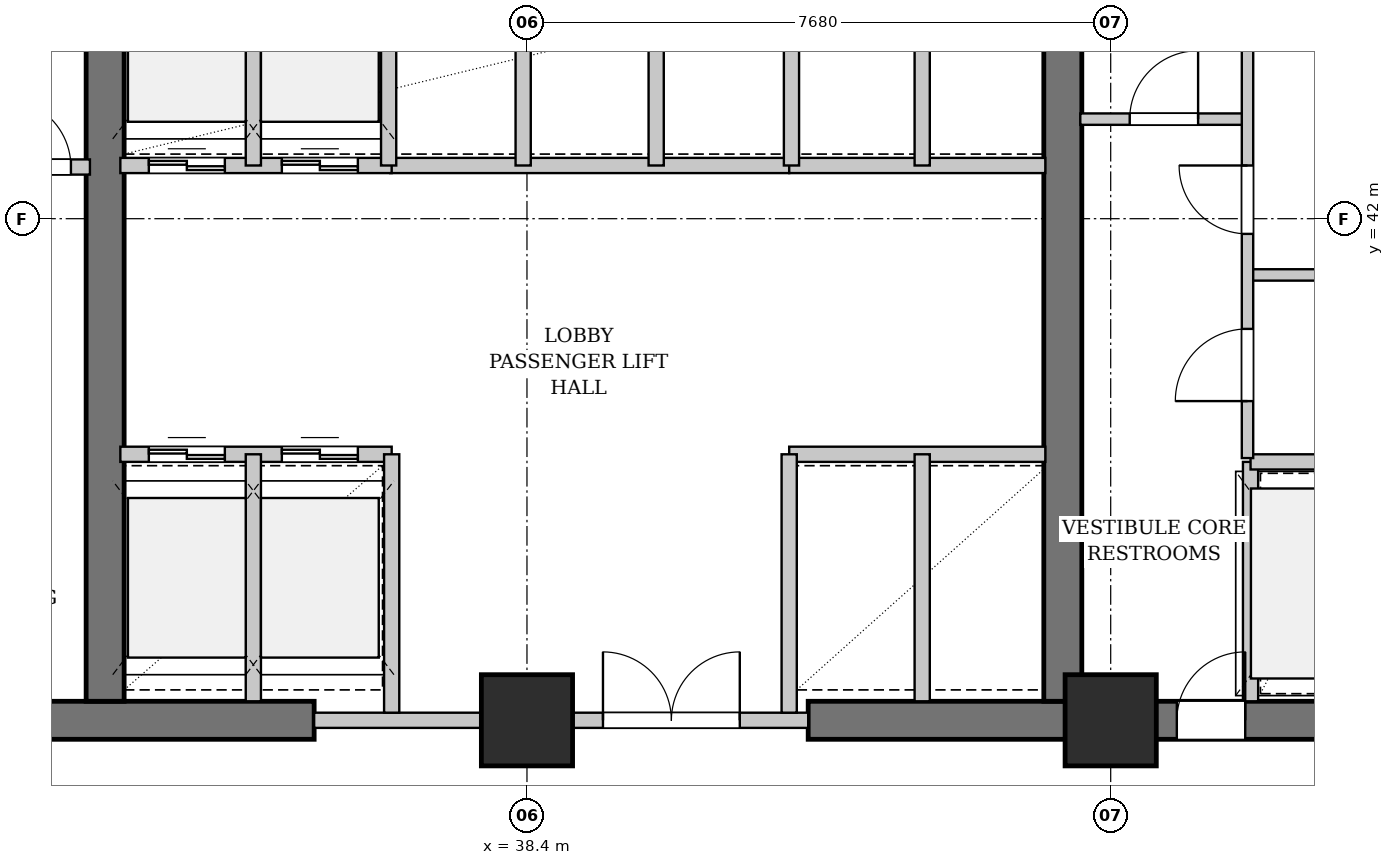
"""IFC4 building model, lengths in metres.
Left out: names, types, materials, properties, quantities, classifications, styles, units other than length and angle.
Written with IfcOpenShell. Run it as: python <this file> out.ifc"""

import sys

from ifc_helpers import new_model, si_unit, direction, frame, frame_2d, origin, origin_2d, place, context, subcontext, project, spatial, rectangle, extrude, element, fill, save


model = new_model("IFC4")
c1 = context("Model", 3, precision=1e-05, world=origin(), true_north=direction((0.0, 1.0)))
c2 = subcontext(c1, "Body", "Model", "MODEL_VIEW")
j1 = project(units=[si_unit("LENGTHUNIT", "METRE"), si_unit("PLANEANGLEUNIT", "RADIAN")], contexts=[c1])
p1 = place(None, origin())
s1 = spatial("IfcSite", under=j1, at=p1, CompositionType="ELEMENT")
p2 = place(p1, origin())
s2 = spatial("IfcBuilding", under=s1, at=p2, CompositionType="ELEMENT")
p3 = place(p2, frame((0.0, 0.0, 37.2)))
s3 = spatial("IfcBuildingStorey", under=s2, at=p3, CompositionType="ELEMENT", Elevation=37.2)
p4 = place(p3, frame((30.72, 35.4, 0.0), z_axis=(0.0, 0.0, 1.0), x_axis=(1.0, 0.0, 0.0)))
e1 = element("IfcWall", 1, at=p4, inside=s3, PredefinedType="SHEAR", context=c2, shape_type="SweptSolid", body=[
    extrude(rectangle(XDim=4.88, YDim=0.5, at=frame_2d((2.44, 0.0))), origin(), (0.0, 0.0, 1.0), 3.18),
])
p5 = place(p3, frame((42.1, 35.4, 0.0), z_axis=(0.0, 0.0, 1.0), x_axis=(1.0, 0.0, 0.0)))
e2 = element("IfcWall", 2, at=p5, inside=s3, PredefinedType="SHEAR", context=c2, shape_type="SweptSolid", body=[
    extrude(rectangle(XDim=8.05, YDim=0.5, at=frame_2d((4.025, 0.0))), origin(), (0.0, 0.0, 1.0), 3.18),
])
p6 = place(p5, frame((4.85, 0.0, 0.0)))
e3 = element("IfcOpeningElement", 3, at=p6, cuts=e2, PredefinedType="OPENING", context=c2, shape_type="SweptSolid", body=[
    extrude(rectangle(XDim=0.9, YDim=2.15, at=frame_2d((0.45, 1.075))), frame((0.0, 0.26, 0.0), z_axis=(0.0, -1.0, 0.0), x_axis=(1.0, 0.0, 0.0)), (0.0, 0.0, 1.0), 0.52),
])
for number, where, z_axis, x_axis in (
    (4, (32.85, 35.65, 0.0), (0.0, 0.0, 1.0), (0.0, 1.0, 0.0)),
    (5, (45.45, 35.65, 0.0), (0.0, 0.0, 1.0), (0.0, 1.0, 0.0)),
):
    element("IfcWall", number, at=place(p3, frame(where, z_axis=z_axis, x_axis=x_axis)), inside=s3, PredefinedType="SHEAR", context=c2, shape_type="SweptSolid", body=[
        extrude(rectangle(XDim=10.3, YDim=0.5, at=frame_2d((5.15, 0.0))), origin(), (0.0, 0.0, 1.0), 3.18),
    ])
for number, where, z_axis, x_axis in (
    (6, (38.4, 35.4, 0.0), (0.0, 0.0, 1.0), (1.0, 0.0, 0.0)),
    (7, (46.08, 35.4, 0.0), (0.0, 0.0, 1.0), (1.0, 0.0, 0.0)),
):
    element("IfcColumn", number, at=place(p3, frame(where, z_axis=z_axis, x_axis=x_axis)), inside=s3, PredefinedType="COLUMN", context=c2, shape_type="SweptSolid", body=[
        extrude(rectangle(XDim=1.2, YDim=1.2, at=origin_2d()), origin(), (0.0, 0.0, 1.0), 3.4),
    ])
p7 = place(p3, frame((27.32, 42.68, 0.0), z_axis=(0.0, 0.0, 1.0), x_axis=(1.0, 0.0, 0.0)))
e8 = element("IfcWall", 8, at=p7, inside=s3, PredefinedType="PARTITIONING", context=c2, shape_type="SweptSolid", body=[
    extrude(rectangle(XDim=5.33, YDim=0.2, at=frame_2d((2.665, 0.0))), origin(), (0.0, 0.0, 1.0), 3.18),
])
p8 = place(p7, frame((4.18, 0.0, 0.0)))
e9 = element("IfcOpeningElement", 9, at=p8, cuts=e8, PredefinedType="OPENING", context=c2, shape_type="SweptSolid", body=[
    extrude(rectangle(XDim=0.9, YDim=2.15, at=frame_2d((0.45, 1.075))), frame((0.0, 0.11, 0.0), z_axis=(0.0, -1.0, 0.0), x_axis=(1.0, 0.0, 0.0)), (0.0, 0.0, 1.0), 0.22),
])
p9 = place(p3, frame((35.6, 35.4, 0.0), z_axis=(0.0, 0.0, 1.0), x_axis=(1.0, 0.0, 0.0)))
e10 = element("IfcWall", 10, at=p9, inside=s3, PredefinedType="PARTITIONING", context=c2, shape_type="SweptSolid", body=[
    extrude(rectangle(XDim=6.5, YDim=0.2, at=frame_2d((3.25, 0.0))), origin(), (0.0, 0.0, 1.0), 2.475),
])
p10 = place(p9, frame((3.8, 0.0, 0.0)))
e11 = element("IfcOpeningElement", 11, at=p10, cuts=e10, PredefinedType="OPENING", context=c2, shape_type="SweptSolid", body=[
    extrude(rectangle(XDim=1.8, YDim=2.3, at=frame_2d((0.9, 1.15))), frame((0.0, 0.11, 0.0), z_axis=(0.0, -1.0, 0.0), x_axis=(1.0, 0.0, 0.0)), (0.0, 0.0, 1.0), 0.22),
])
p11 = place(p3, frame((36.6, 42.7, 0.0), z_axis=(0.0, 0.0, 1.0), x_axis=(1.0, 0.0, 0.0)))
e12 = element("IfcWall", 12, at=p11, inside=s3, PredefinedType="PARTITIONING", context=c2, shape_type="SweptSolid", body=[
    extrude(rectangle(XDim=5.25, YDim=0.2, at=frame_2d((2.625, 0.0))), origin(), (0.0, 0.0, 1.0), 3.18),
])
p12 = place(p3, frame((38.35, 42.7, 0.0), z_axis=(0.0, 0.0, 1.0), x_axis=(0.0, 1.0, 0.0)))
e13 = element("IfcWall", 13, at=p12, inside=s3, PredefinedType="PARTITIONING", context=c2, shape_type="SweptSolid", body=[
    extrude(rectangle(XDim=3.22, YDim=0.2, at=frame_2d((1.61, 0.0))), origin(), (0.0, 0.0, 1.0), 2.475),
])
p13 = place(p3, frame((40.1, 42.7, 0.0), z_axis=(0.0, 0.0, 1.0), x_axis=(0.0, 1.0, 0.0)))
e14 = element("IfcWall", 14, at=p13, inside=s3, PredefinedType="PARTITIONING", context=c2, shape_type="SweptSolid", body=[
    extrude(rectangle(XDim=3.22, YDim=0.2, at=frame_2d((1.61, 0.0))), origin(), (0.0, 0.0, 1.0), 3.18),
])
p14 = place(p3, frame((33.05, 38.9, 0.0), z_axis=(0.0, 0.0, 1.0), x_axis=(1.0, 0.0, 0.0)))
e15 = element("IfcWall", 15, at=p14, inside=s3, PredefinedType="PARTITIONING", context=c2, shape_type="SweptSolid", body=[
    extrude(rectangle(XDim=3.57, YDim=0.2, at=frame_2d((1.785, 0.0))), origin(), (0.0, 0.0, 1.0), 3.18),
])
p15 = place(p14, frame((0.375, 0.0, 0.0)))
e16 = element("IfcOpeningElement", 16, at=p15, cuts=e15, PredefinedType="OPENING", context=c2, shape_type="SweptSolid", body=[
    extrude(rectangle(XDim=1.0, YDim=2.2, at=frame_2d((0.5, 1.1))), frame((0.0, 0.11, 0.0), z_axis=(0.0, -1.0, 0.0), x_axis=(1.0, 0.0, 0.0)), (0.0, 0.0, 1.0), 0.22),
])
p16 = place(p14, frame((2.125, 0.0, 0.0)))
e17 = element("IfcOpeningElement", 17, at=p16, cuts=e15, PredefinedType="OPENING", context=c2, shape_type="SweptSolid", body=[
    extrude(rectangle(XDim=1.0, YDim=2.2, at=frame_2d((0.5, 1.1))), frame((0.0, 0.11, 0.0), z_axis=(0.0, -1.0, 0.0), x_axis=(1.0, 0.0, 0.0)), (0.0, 0.0, 1.0), 0.22),
])
p17 = place(p3, frame((33.05, 42.7, 0.0), z_axis=(0.0, 0.0, 1.0), x_axis=(1.0, 0.0, 0.0)))
e18 = element("IfcWall", 18, at=p17, inside=s3, PredefinedType="PARTITIONING", context=c2, shape_type="SweptSolid", body=[
    extrude(rectangle(XDim=3.57, YDim=0.2, at=frame_2d((1.785, 0.0))), origin(), (0.0, 0.0, 1.0), 3.18),
])
p18 = place(p17, frame((0.375, 0.0, 0.0)))
e19 = element("IfcOpeningElement", 19, at=p18, cuts=e18, PredefinedType="OPENING", context=c2, shape_type="SweptSolid", body=[
    extrude(rectangle(XDim=1.0, YDim=2.2, at=frame_2d((0.5, 1.1))), frame((0.0, 0.11, 0.0), z_axis=(0.0, -1.0, 0.0), x_axis=(1.0, 0.0, 0.0)), (0.0, 0.0, 1.0), 0.22),
])
p19 = place(p17, frame((2.125, 0.0, 0.0)))
e20 = element("IfcOpeningElement", 20, at=p19, cuts=e18, PredefinedType="OPENING", context=c2, shape_type="SweptSolid", body=[
    extrude(rectangle(XDim=1.0, YDim=2.2, at=frame_2d((0.5, 1.1))), frame((0.0, 0.11, 0.0), z_axis=(0.0, -1.0, 0.0), x_axis=(1.0, 0.0, 0.0)), (0.0, 0.0, 1.0), 0.22),
])
p20 = place(p3, frame((34.8, 35.65, 0.0), z_axis=(0.0, 0.0, 1.0), x_axis=(0.0, 1.0, 0.0)))
e21 = element("IfcWall", 21, at=p20, inside=s3, PredefinedType="PARTITIONING", context=c2, shape_type="SweptSolid", body=[
    extrude(rectangle(XDim=3.25, YDim=0.2, at=frame_2d((1.625, 0.0))), origin(), (0.0, 0.0, 1.0), 3.18),
])
p21 = place(p3, frame((34.8, 42.7, 0.0), z_axis=(0.0, 0.0, 1.0), x_axis=(0.0, 1.0, 0.0)))
e22 = element("IfcWall", 22, at=p21, inside=s3, PredefinedType="PARTITIONING", context=c2, shape_type="SweptSolid", body=[
    extrude(rectangle(XDim=3.22, YDim=0.2, at=frame_2d((1.61, 0.0))), origin(), (0.0, 0.0, 1.0), 3.18),
])
p22 = place(p3, frame((36.62, 35.5, 0.0), z_axis=(0.0, 0.0, 1.0), x_axis=(0.0, 1.0, 0.0)))
e23 = element("IfcWall", 23, at=p22, inside=s3, PredefinedType="PARTITIONING", context=c2, shape_type="SweptSolid", body=[
    extrude(rectangle(XDim=3.4, YDim=0.2, at=frame_2d((1.7, 0.0))), origin(), (0.0, 0.0, 1.0), 3.18),
])
p23 = place(p3, frame((36.58, 42.7, 0.0), z_axis=(0.0, 0.0, 1.0), x_axis=(0.0, 1.0, 0.0)))
e24 = element("IfcWall", 24, at=p23, inside=s3, PredefinedType="PARTITIONING", context=c2, shape_type="SweptSolid", body=[
    extrude(rectangle(XDim=3.22, YDim=0.2, at=frame_2d((1.61, 0.0))), origin(), (0.0, 0.0, 1.0), 3.18),
])
for number, where, z_axis, x_axis in (
    (25, (41.85, 38.9, 0.0), (0.0, 0.0, 1.0), (1.0, 0.0, 0.0)),
    (26, (41.85, 42.7, 0.0), (0.0, 0.0, 1.0), (1.0, 0.0, 0.0)),
):
    element("IfcWall", number, at=place(p3, frame(where, z_axis=z_axis, x_axis=x_axis)), inside=s3, PredefinedType="PARTITIONING", context=c2, shape_type="SweptSolid", body=[
        extrude(rectangle(XDim=3.37, YDim=0.2, at=frame_2d((1.685, 0.0))), origin(), (0.0, 0.0, 1.0), 3.18),
    ])
p24 = place(p3, frame((43.6, 35.65, 0.0), z_axis=(0.0, 0.0, 1.0), x_axis=(0.0, 1.0, 0.0)))
e27 = element("IfcWall", 27, at=p24, inside=s3, PredefinedType="PARTITIONING", context=c2, shape_type="SweptSolid", body=[
    extrude(rectangle(XDim=3.25, YDim=0.2, at=frame_2d((1.625, 0.0))), origin(), (0.0, 0.0, 1.0), 3.18),
])
p25 = place(p3, frame((43.6, 42.7, 0.0), z_axis=(0.0, 0.0, 1.0), x_axis=(0.0, 1.0, 0.0)))
e28 = element("IfcWall", 28, at=p25, inside=s3, PredefinedType="PARTITIONING", context=c2, shape_type="SweptSolid", body=[
    extrude(rectangle(XDim=3.22, YDim=0.2, at=frame_2d((1.61, 0.0))), origin(), (0.0, 0.0, 1.0), 3.18),
])
p26 = place(p3, frame((41.85, 35.5, 0.0), z_axis=(0.0, 0.0, 1.0), x_axis=(0.0, 1.0, 0.0)))
e29 = element("IfcWall", 29, at=p26, inside=s3, PredefinedType="PARTITIONING", context=c2, shape_type="SweptSolid", body=[
    extrude(rectangle(XDim=3.4, YDim=0.2, at=frame_2d((1.7, 0.0))), origin(), (0.0, 0.0, 1.0), 3.18),
])
p27 = place(p3, frame((41.88, 42.7, 0.0), z_axis=(0.0, 0.0, 1.0), x_axis=(0.0, 1.0, 0.0)))
e30 = element("IfcWall", 30, at=p27, inside=s3, PredefinedType="PARTITIONING", context=c2, shape_type="SweptSolid", body=[
    extrude(rectangle(XDim=3.22, YDim=0.2, at=frame_2d((1.61, 0.0))), origin(), (0.0, 0.0, 1.0), 3.18),
])
p28 = place(p3, frame((47.92, 35.65, 0.0), z_axis=(0.0, 0.0, 1.0), x_axis=(0.0, 1.0, 0.0)))
e31 = element("IfcWall", 31, at=p28, inside=s3, PredefinedType="PARTITIONING", context=c2, shape_type="SweptSolid", body=[
    extrude(rectangle(XDim=3.15, YDim=0.2, at=frame_2d((1.575, 0.0))), origin(), (0.0, 0.0, 1.0), 3.18),
])
p29 = place(p3, frame((47.92, 38.8, 0.0), z_axis=(0.0, 0.0, 1.0), x_axis=(1.0, 0.0, 0.0)))
e32 = element("IfcWall", 32, at=p29, inside=s3, PredefinedType="PARTITIONING", context=c2, shape_type="SweptSolid", body=[
    extrude(rectangle(XDim=1.86, YDim=0.2, at=frame_2d((0.93, 0.0))), origin(), (0.0, 0.0, 1.0), 3.18),
])
p30 = place(p3, frame((45.68, 43.31, 0.0), z_axis=(0.0, 0.0, 1.0), x_axis=(1.0, 0.0, 0.0)))
e33 = element("IfcWall", 33, at=p30, inside=s3, PredefinedType="PARTITIONING", context=c2, shape_type="SweptSolid", body=[
    extrude(rectangle(XDim=2.2, YDim=0.15, at=frame_2d((1.1, 0.0))), origin(), (0.0, 0.0, 1.0), 3.18),
])
p31 = place(p30, frame((0.65, 0.0, 0.0)))
e34 = element("IfcOpeningElement", 34, at=p31, cuts=e33, PredefinedType="OPENING", context=c2, shape_type="SweptSolid", body=[
    extrude(rectangle(XDim=0.9, YDim=2.15, at=frame_2d((0.45, 1.075))), frame((0.0, 0.085, 0.0), z_axis=(0.0, -1.0, 0.0), x_axis=(1.0, 0.0, 0.0)), (0.0, 0.0, 1.0), 0.17),
])
p32 = place(p3, frame((47.88, 41.26, 0.0), z_axis=(0.0, 0.0, 1.0), x_axis=(1.0, 0.0, 0.0)))
e35 = element("IfcWall", 35, at=p32, inside=s3, PredefinedType="PARTITIONING", context=c2, shape_type="SweptSolid", body=[
    extrude(rectangle(XDim=2.3, YDim=0.15, at=frame_2d((1.15, 0.0))), origin(), (0.0, 0.0, 1.0), 3.18),
])
p33 = place(p3, frame((47.88, 38.85, 0.0), z_axis=(0.0, 0.0, 1.0), x_axis=(0.0, 1.0, 0.0)))
e36 = element("IfcWall", 36, at=p33, inside=s3, PredefinedType="PARTITIONING", context=c2, shape_type="SweptSolid", body=[
    extrude(rectangle(XDim=7.07, YDim=0.15, at=frame_2d((3.535, 0.0))), origin(), (0.0, 0.0, 1.0), 3.18),
])
p34 = place(p33, frame((0.75, 0.0, 0.0)))
e37 = element("IfcOpeningElement", 37, at=p34, cuts=e36, PredefinedType="OPENING", context=c2, shape_type="SweptSolid", body=[
    extrude(rectangle(XDim=0.95, YDim=2.15, at=frame_2d((0.475, 1.075))), frame((0.0, 0.085, 0.0), z_axis=(0.0, -1.0, 0.0), x_axis=(1.0, 0.0, 0.0)), (0.0, 0.0, 1.0), 0.17),
])
p35 = place(p33, frame((2.95, 0.0, 0.0)))
e38 = element("IfcOpeningElement", 38, at=p35, cuts=e36, PredefinedType="OPENING", context=c2, shape_type="SweptSolid", body=[
    extrude(rectangle(XDim=0.9, YDim=2.15, at=frame_2d((0.45, 1.075))), frame((0.0, 0.085, 0.0), z_axis=(0.0, -1.0, 0.0), x_axis=(1.0, 0.0, 0.0)), (0.0, 0.0, 1.0), 0.17),
])
p36 = place(p8, origin())
e39 = element("IfcDoor", 39, at=p36, inside=s3, OperationType="SINGLE_SWING_LEFT", PredefinedType="DOOR", context=c2, shape_type="SweptSolid", body=[
    extrude(rectangle(XDim=0.9, YDim=2.15, at=frame_2d((0.45, 1.075))), frame((0.0, 0.025, 0.0), z_axis=(0.0, -1.0, 0.0), x_axis=(1.0, 0.0, 0.0)), (0.0, 0.0, 1.0), 0.05),
])
fill(e9, e39)
p37 = place(p10, origin())
e40 = element("IfcDoor", 40, at=p37, inside=s3, OperationType="DOUBLE_DOOR_SINGLE_SWING", PredefinedType="DOOR", context=c2, shape_type="SweptSolid", body=[
    extrude(rectangle(XDim=1.8, YDim=2.3, at=frame_2d((0.9, 1.15))), frame((0.0, 0.025, 0.0), z_axis=(0.0, -1.0, 0.0), x_axis=(1.0, 0.0, 0.0)), (0.0, 0.0, 1.0), 0.05),
])
fill(e11, e40)
p38 = place(p15, origin())
e41 = element("IfcDoor", 41, at=p38, inside=s3, OperationType="DOUBLE_DOOR_SLIDING", PredefinedType="DOOR", context=c2, shape_type="SweptSolid", body=[
    extrude(rectangle(XDim=1.0, YDim=2.2, at=frame_2d((0.5, 1.1))), frame((0.0, 0.025, 0.0), z_axis=(0.0, -1.0, 0.0), x_axis=(1.0, 0.0, 0.0)), (0.0, 0.0, 1.0), 0.05),
])
fill(e16, e41)
p39 = place(p16, origin())
e42 = element("IfcDoor", 42, at=p39, inside=s3, OperationType="DOUBLE_DOOR_SLIDING", PredefinedType="DOOR", context=c2, shape_type="SweptSolid", body=[
    extrude(rectangle(XDim=1.0, YDim=2.2, at=frame_2d((0.5, 1.1))), frame((0.0, 0.025, 0.0), z_axis=(0.0, -1.0, 0.0), x_axis=(1.0, 0.0, 0.0)), (0.0, 0.0, 1.0), 0.05),
])
fill(e17, e42)
p40 = place(p18, origin())
e43 = element("IfcDoor", 43, at=p40, inside=s3, OperationType="DOUBLE_DOOR_SLIDING", PredefinedType="DOOR", context=c2, shape_type="SweptSolid", body=[
    extrude(rectangle(XDim=1.0, YDim=2.2, at=frame_2d((0.5, 1.1))), frame((0.0, 0.025, 0.0), z_axis=(0.0, -1.0, 0.0), x_axis=(1.0, 0.0, 0.0)), (0.0, 0.0, 1.0), 0.05),
])
fill(e19, e43)
p41 = place(p19, origin())
e44 = element("IfcDoor", 44, at=p41, inside=s3, OperationType="DOUBLE_DOOR_SLIDING", PredefinedType="DOOR", context=c2, shape_type="SweptSolid", body=[
    extrude(rectangle(XDim=1.0, YDim=2.2, at=frame_2d((0.5, 1.1))), frame((0.0, 0.025, 0.0), z_axis=(0.0, -1.0, 0.0), x_axis=(1.0, 0.0, 0.0)), (0.0, 0.0, 1.0), 0.05),
])
fill(e20, e44)
p42 = place(p31, origin())
e45 = element("IfcDoor", 45, at=p42, inside=s3, OperationType="SINGLE_SWING_RIGHT", PredefinedType="DOOR", context=c2, shape_type="SweptSolid", body=[
    extrude(rectangle(XDim=0.9, YDim=2.15, at=frame_2d((0.45, 1.075))), frame((0.0, 0.025, 0.0), z_axis=(0.0, -1.0, 0.0), x_axis=(1.0, 0.0, 0.0)), (0.0, 0.0, 1.0), 0.05),
])
fill(e34, e45)
p43 = place(p34, origin())
e46 = element("IfcDoor", 46, at=p43, inside=s3, OperationType="SINGLE_SWING_LEFT", PredefinedType="DOOR", context=c2, shape_type="SweptSolid", body=[
    extrude(rectangle(XDim=0.95, YDim=2.15, at=frame_2d((0.475, 1.075))), frame((0.0, 0.025, 0.0), z_axis=(0.0, -1.0, 0.0), x_axis=(1.0, 0.0, 0.0)), (0.0, 0.0, 1.0), 0.05),
])
fill(e37, e46)
p44 = place(p35, origin())
e47 = element("IfcDoor", 47, at=p44, inside=s3, OperationType="SINGLE_SWING_RIGHT", PredefinedType="DOOR", context=c2, shape_type="SweptSolid", body=[
    extrude(rectangle(XDim=0.9, YDim=2.15, at=frame_2d((0.45, 1.075))), frame((0.0, 0.025, 0.0), z_axis=(0.0, -1.0, 0.0), x_axis=(1.0, 0.0, 0.0)), (0.0, 0.0, 1.0), 0.05),
])
fill(e38, e47)
p45 = place(p6, origin())
e48 = element("IfcDoor", 48, at=p45, inside=s3, OperationType="SINGLE_SWING_RIGHT", PredefinedType="DOOR", context=c2, shape_type="SweptSolid", body=[
    extrude(rectangle(XDim=0.9, YDim=2.15, at=frame_2d((0.45, 1.075))), frame((0.0, 0.025, 0.0), z_axis=(0.0, -1.0, 0.0), x_axis=(1.0, 0.0, 0.0)), (0.0, 0.0, 1.0), 0.05),
])
fill(e3, e48)
save(model, sys.argv[1])
